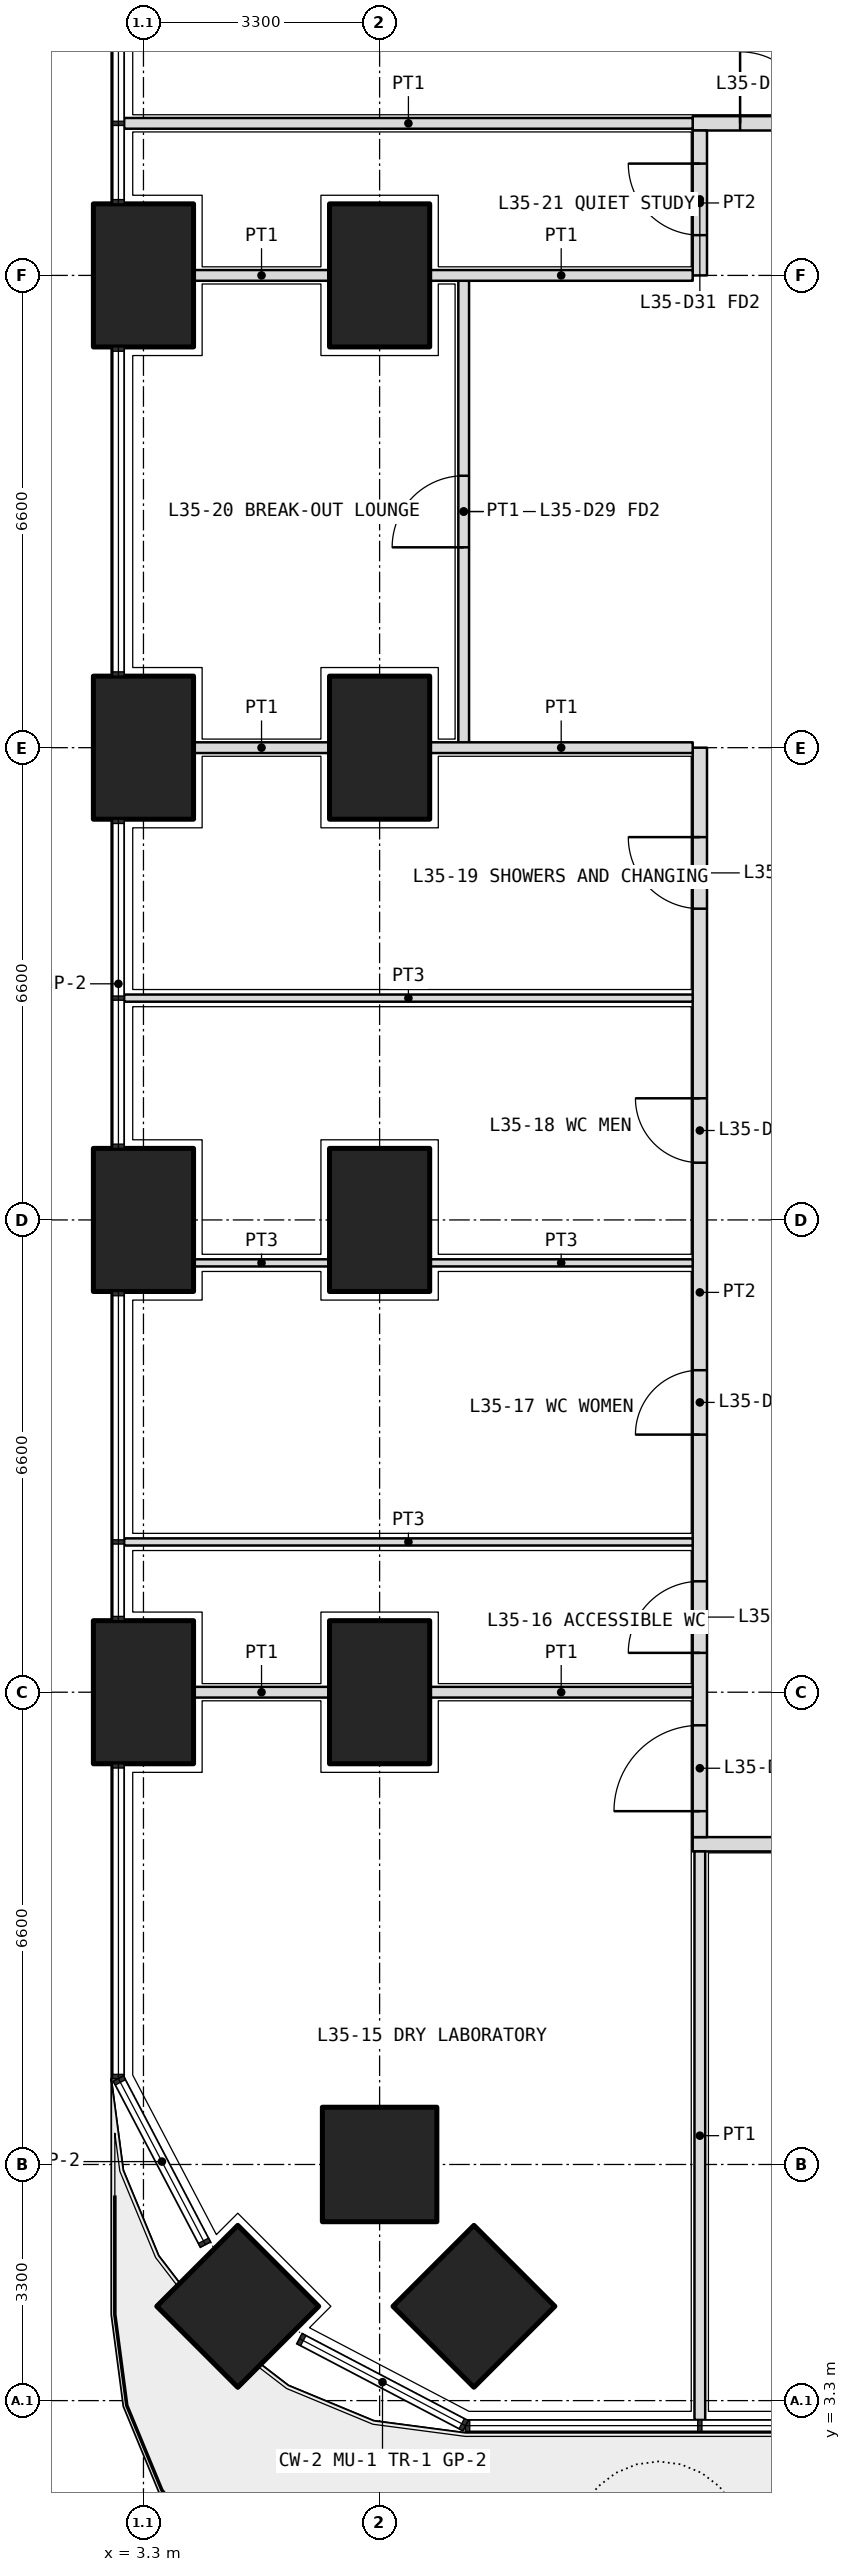
"""IFC4 building model, lengths in metres.
Left out: names, types, materials, properties, quantities, classifications, styles, units other than length and angle.
Written with IfcOpenShell. Run it as: python <this file> out.ifc"""

import sys

from ifc_helpers import new_model, si_unit, direction, frame, frame_2d, origin, origin_2d, place, context, subcontext, project, spatial, rectangle, extrude, element, fill, save


model = new_model("IFC4")
c1 = context("Model", 3, precision=1e-05, world=origin(), true_north=direction((0.0, 1.0)))
c2 = subcontext(c1, "Body", "Model", "MODEL_VIEW")
j1 = project(units=[si_unit("LENGTHUNIT", "METRE"), si_unit("PLANEANGLEUNIT", "RADIAN")], contexts=[c1])
p1 = place(None, origin())
s1 = spatial("IfcSite", under=j1, at=p1, CompositionType="ELEMENT")
p2 = place(p1, origin())
s2 = spatial("IfcBuilding", under=s1, at=p2, CompositionType="ELEMENT")
p3 = place(p2, frame((0.0, 0.0, 155.7)))
s3 = spatial("IfcBuildingStorey", under=s2, at=p3, CompositionType="ELEMENT", Elevation=155.7)
p4 = place(p3, frame((4.618, 4.618, 0.0), z_axis=(0.0, 0.0, 1.0), x_axis=(0.707106781187, 0.707106781187, 0.0)))
e1 = element("IfcColumn", 1, at=p4, inside=s3, PredefinedType="COLUMN", context=c2, shape_type="SweptSolid", body=[
    extrude(rectangle(XDim=1.6, YDim=1.6, at=origin_2d()), origin(), (0.0, 0.0, 1.0), 4.2),
])
for number, where, z_axis, x_axis in (
    (2, (3.3, 13.2, 0.0), (0.0, 0.0, 1.0), (0.0, 1.0, 0.0)),
    (3, (3.3, 19.8, 0.0), (0.0, 0.0, 1.0), (0.0, 1.0, 0.0)),
    (4, (3.3, 26.4, 0.0), (0.0, 0.0, 1.0), (0.0, 1.0, 0.0)),
    (5, (3.3, 33.0, 0.0), (0.0, 0.0, 1.0), (0.0, 1.0, 0.0)),
):
    element("IfcColumn", number, at=place(p3, frame(where, z_axis=z_axis, x_axis=x_axis)), inside=s3, PredefinedType="COLUMN", context=c2, shape_type="SweptSolid", body=[
        extrude(rectangle(XDim=2.0, YDim=1.4, at=origin_2d()), origin(), (0.0, 0.0, 1.0), 4.2),
    ])
for number, where, z_axis, x_axis in (
    (6, (6.6, 6.6, 0.0), (0.0, 0.0, 1.0), (1.0, 0.0, 0.0)),
    (7, (7.918, 4.618, 0.0), (0.0, 0.0, 1.0), (0.707, 0.707, 0.0)),
):
    element("IfcColumn", number, at=place(p3, frame(where, z_axis=z_axis, x_axis=x_axis)), inside=s3, PredefinedType="COLUMN", context=c2, shape_type="SweptSolid", body=[
        extrude(rectangle(XDim=1.6, YDim=1.6, at=origin_2d()), origin(), (0.0, 0.0, 1.0), 4.2),
    ])
for number, where, z_axis, x_axis in (
    (8, (6.6, 13.2, 0.0), (0.0, 0.0, 1.0), (0.0, 1.0, 0.0)),
    (9, (6.6, 19.8, 0.0), (0.0, 0.0, 1.0), (0.0, 1.0, 0.0)),
    (10, (6.6, 26.4, 0.0), (0.0, 0.0, 1.0), (0.0, 1.0, 0.0)),
    (11, (6.6, 33.0, 0.0), (0.0, 0.0, 1.0), (0.0, 1.0, 0.0)),
):
    element("IfcColumn", number, at=place(p3, frame(where, z_axis=z_axis, x_axis=x_axis)), inside=s3, PredefinedType="COLUMN", context=c2, shape_type="SweptSolid", body=[
        extrude(rectangle(XDim=2.0, YDim=1.4, at=origin_2d()), origin(), (0.0, 0.0, 1.0), 4.2),
    ])
p5 = place(p3, frame((10.975, 11.075, 0.0), z_axis=(0.0, 0.0, 1.0), x_axis=(1.0, 0.0, 0.0)))
e12 = element("IfcWall", 12, at=p5, inside=s3, PredefinedType="PARTITIONING", context=c2, shape_type="SweptSolid", body=[
    extrude(rectangle(XDim=30.85, YDim=0.2, at=frame_2d((15.425, 0.0))), origin(), (0.0, 0.0, 1.0), 2.85),
])
p6 = place(p5, frame((13.863, 0.0, 0.0)))
e13 = element("IfcOpeningElement", 13, at=p6, cuts=e12, PredefinedType="OPENING", context=c2, shape_type="SweptSolid", body=[
    extrude(rectangle(XDim=1.0, YDim=2.1, at=frame_2d((0.5, 1.05))), frame((0.0, 0.11, 0.0), z_axis=(0.0, -1.0, 0.0), x_axis=(1.0, 0.0, 0.0)), (0.0, 0.0, 1.0), 0.22),
])
p7 = place(p5, frame((29.087, 0.0, 0.0)))
e14 = element("IfcOpeningElement", 14, at=p7, cuts=e12, PredefinedType="OPENING", context=c2, shape_type="SweptSolid", body=[
    extrude(rectangle(XDim=1.2, YDim=2.1, at=frame_2d((0.6, 1.05))), frame((0.0, 0.11, 0.0), z_axis=(0.0, -1.0, 0.0), x_axis=(1.0, 0.0, 0.0)), (0.0, 0.0, 1.0), 0.22),
])
p8 = place(p3, frame((10.975, 35.125, 0.0), z_axis=(0.0, 0.0, 1.0), x_axis=(1.0, 0.0, 0.0)))
e15 = element("IfcWall", 15, at=p8, inside=s3, PredefinedType="PARTITIONING", context=c2, shape_type="SweptSolid", body=[
    extrude(rectangle(XDim=30.85, YDim=0.2, at=frame_2d((15.425, 0.0))), origin(), (0.0, 0.0, 1.0), 2.85),
])
p9 = place(p8, frame((0.663, 0.0, 0.0)))
e16 = element("IfcOpeningElement", 16, at=p9, cuts=e15, PredefinedType="OPENING", context=c2, shape_type="SweptSolid", body=[
    extrude(rectangle(XDim=1.0, YDim=2.1, at=frame_2d((0.5, 1.05))), frame((0.0, 0.11, 0.0), z_axis=(0.0, -1.0, 0.0), x_axis=(1.0, 0.0, 0.0)), (0.0, 0.0, 1.0), 0.22),
])
p10 = place(p8, frame((3.275, 0.0, 0.0)))
e17 = element("IfcOpeningElement", 17, at=p10, cuts=e15, PredefinedType="OPENING", context=c2, shape_type="SweptSolid", body=[
    extrude(rectangle(XDim=1.2, YDim=2.1, at=frame_2d((0.6, 1.05))), frame((0.0, 0.11, 0.0), z_axis=(0.0, -1.0, 0.0), x_axis=(1.0, 0.0, 0.0)), (0.0, 0.0, 1.0), 0.22),
])
p11 = place(p8, frame((8.325, 0.0, 0.0)))
e18 = element("IfcOpeningElement", 18, at=p11, cuts=e15, PredefinedType="OPENING", context=c2, shape_type="SweptSolid", body=[
    extrude(rectangle(XDim=1.0, YDim=2.1, at=frame_2d((0.5, 1.05))), frame((0.0, 0.11, 0.0), z_axis=(0.0, -1.0, 0.0), x_axis=(1.0, 0.0, 0.0)), (0.0, 0.0, 1.0), 0.22),
])
p12 = place(p8, frame((13.375, 0.0, 0.0)))
e19 = element("IfcOpeningElement", 19, at=p12, cuts=e15, PredefinedType="OPENING", context=c2, shape_type="SweptSolid", body=[
    extrude(rectangle(XDim=1.0, YDim=2.1, at=frame_2d((0.5, 1.05))), frame((0.0, 0.11, 0.0), z_axis=(0.0, -1.0, 0.0), x_axis=(1.0, 0.0, 0.0)), (0.0, 0.0, 1.0), 0.22),
])
p13 = place(p8, frame((16.675, 0.0, 0.0)))
e20 = element("IfcOpeningElement", 20, at=p13, cuts=e15, PredefinedType="OPENING", context=c2, shape_type="SweptSolid", body=[
    extrude(rectangle(XDim=1.0, YDim=2.1, at=frame_2d((0.5, 1.05))), frame((0.0, 0.11, 0.0), z_axis=(0.0, -1.0, 0.0), x_axis=(1.0, 0.0, 0.0)), (0.0, 0.0, 1.0), 0.22),
])
p14 = place(p8, frame((24.137, 0.0, 0.0)))
e21 = element("IfcOpeningElement", 21, at=p14, cuts=e15, PredefinedType="OPENING", context=c2, shape_type="SweptSolid", body=[
    extrude(rectangle(XDim=1.2, YDim=2.1, at=frame_2d((0.6, 1.05))), frame((0.0, 0.11, 0.0), z_axis=(0.0, -1.0, 0.0), x_axis=(1.0, 0.0, 0.0)), (0.0, 0.0, 1.0), 0.22),
])
p15 = place(p3, frame((11.075, 11.175, 0.0), z_axis=(0.0, 0.0, 1.0), x_axis=(0.0, 1.0, 0.0)))
e22 = element("IfcWall", 22, at=p15, inside=s3, PredefinedType="PARTITIONING", context=c2, shape_type="SweptSolid", body=[
    extrude(rectangle(XDim=15.225, YDim=0.2, at=frame_2d((7.612, 0.0))), origin(), (0.0, 0.0, 1.0), 2.85),
])
p16 = place(p15, frame((0.363, 0.0, 0.0)))
e23 = element("IfcOpeningElement", 23, at=p16, cuts=e22, PredefinedType="OPENING", context=c2, shape_type="SweptSolid", body=[
    extrude(rectangle(XDim=1.2, YDim=2.1, at=frame_2d((0.6, 1.05))), frame((0.0, 0.11, 0.0), z_axis=(0.0, -1.0, 0.0), x_axis=(1.0, 0.0, 0.0)), (0.0, 0.0, 1.0), 0.22),
])
p17 = place(p15, frame((2.575, 0.0, 0.0)))
e24 = element("IfcOpeningElement", 24, at=p17, cuts=e22, PredefinedType="OPENING", context=c2, shape_type="SweptSolid", body=[
    extrude(rectangle(XDim=1.0, YDim=2.1, at=frame_2d((0.5, 1.05))), frame((0.0, 0.11, 0.0), z_axis=(0.0, -1.0, 0.0), x_axis=(1.0, 0.0, 0.0)), (0.0, 0.0, 1.0), 0.22),
])
p18 = place(p15, frame((5.625, 0.0, 0.0)))
e25 = element("IfcOpeningElement", 25, at=p18, cuts=e22, PredefinedType="OPENING", context=c2, shape_type="SweptSolid", body=[
    extrude(rectangle(XDim=0.9, YDim=2.1, at=frame_2d((0.45, 1.05))), frame((0.0, 0.11, 0.0), z_axis=(0.0, -1.0, 0.0), x_axis=(1.0, 0.0, 0.0)), (0.0, 0.0, 1.0), 0.22),
])
p19 = place(p15, frame((9.425, 0.0, 0.0)))
e26 = element("IfcOpeningElement", 26, at=p19, cuts=e22, PredefinedType="OPENING", context=c2, shape_type="SweptSolid", body=[
    extrude(rectangle(XDim=0.9, YDim=2.1, at=frame_2d((0.45, 1.05))), frame((0.0, 0.11, 0.0), z_axis=(0.0, -1.0, 0.0), x_axis=(1.0, 0.0, 0.0)), (0.0, 0.0, 1.0), 0.22),
])
p20 = place(p15, frame((12.975, 0.0, 0.0)))
e27 = element("IfcOpeningElement", 27, at=p20, cuts=e22, PredefinedType="OPENING", context=c2, shape_type="SweptSolid", body=[
    extrude(rectangle(XDim=1.0, YDim=2.1, at=frame_2d((0.5, 1.05))), frame((0.0, 0.11, 0.0), z_axis=(0.0, -1.0, 0.0), x_axis=(1.0, 0.0, 0.0)), (0.0, 0.0, 1.0), 0.22),
])
p21 = place(p3, frame((11.075, 33.0, 0.0), z_axis=(0.0, 0.0, 1.0), x_axis=(0.0, 1.0, 0.0)))
e28 = element("IfcWall", 28, at=p21, inside=s3, PredefinedType="PARTITIONING", context=c2, shape_type="SweptSolid", body=[
    extrude(rectangle(XDim=2.025, YDim=0.2, at=frame_2d((1.012, 0.0))), origin(), (0.0, 0.0, 1.0), 2.85),
])
p22 = place(p21, frame((0.562, 0.0, 0.0)))
e29 = element("IfcOpeningElement", 29, at=p22, cuts=e28, PredefinedType="OPENING", context=c2, shape_type="SweptSolid", body=[
    extrude(rectangle(XDim=1.0, YDim=2.1, at=frame_2d((0.5, 1.05))), frame((0.0, 0.11, 0.0), z_axis=(0.0, -1.0, 0.0), x_axis=(1.0, 0.0, 0.0)), (0.0, 0.0, 1.0), 0.22),
])
for number, where, z_axis, x_axis in (
    (30, (11.075, 3.03, 0.0), (0.0, 0.0, 1.0), (0.0, 1.0, 0.0)),
    (31, (3.03, 35.125, 0.0), (0.0, 0.0, 1.0), (1.0, 0.0, 0.0)),
):
    element("IfcWall", number, at=place(p3, frame(where, z_axis=z_axis, x_axis=x_axis)), inside=s3, PredefinedType="PARTITIONING", context=c2, shape_type="SweptSolid", body=[
        extrude(rectangle(XDim=7.945, YDim=0.15, at=frame_2d((3.973, 0.0))), origin(), (0.0, 0.0, 1.0), 2.7),
    ])
p23 = place(p3, frame((3.03, 15.3, 0.0), z_axis=(0.0, 0.0, 1.0), x_axis=(1.0, 0.0, 0.0)))
e32 = element("IfcWall", 32, at=p23, inside=s3, PredefinedType="PARTITIONING", context=c2, shape_type="SweptSolid", body=[
    extrude(rectangle(XDim=7.945, YDim=0.1, at=frame_2d((3.973, 0.0))), origin(), (0.0, 0.0, 1.0), 2.7),
])
p24 = place(p3, frame((4.0, 19.2, 0.0), z_axis=(0.0, 0.0, 1.0), x_axis=(1.0, 0.0, 0.0)))
e33 = element("IfcWall", 33, at=p24, inside=s3, PredefinedType="PARTITIONING", context=c2, shape_type="SweptSolid", body=[
    extrude(rectangle(XDim=1.9, YDim=0.1, at=frame_2d((0.95, 0.0))), origin(), (0.0, 0.0, 1.0), 2.85),
])
p25 = place(p3, frame((7.3, 19.2, 0.0), z_axis=(0.0, 0.0, 1.0), x_axis=(1.0, 0.0, 0.0)))
e34 = element("IfcWall", 34, at=p25, inside=s3, PredefinedType="PARTITIONING", context=c2, shape_type="SweptSolid", body=[
    extrude(rectangle(XDim=3.675, YDim=0.1, at=frame_2d((1.837, 0.0))), origin(), (0.0, 0.0, 1.0), 2.85),
])
p26 = place(p3, frame((3.03, 22.9, 0.0), z_axis=(0.0, 0.0, 1.0), x_axis=(1.0, 0.0, 0.0)))
e35 = element("IfcWall", 35, at=p26, inside=s3, PredefinedType="PARTITIONING", context=c2, shape_type="SweptSolid", body=[
    extrude(rectangle(XDim=7.945, YDim=0.1, at=frame_2d((3.973, 0.0))), origin(), (0.0, 0.0, 1.0), 2.7),
])
p27 = place(p3, frame((7.775, 26.4, 0.0), z_axis=(0.0, 0.0, 1.0), x_axis=(0.0, 1.0, 0.0)))
e36 = element("IfcWall", 36, at=p27, inside=s3, PredefinedType="PARTITIONING", context=c2, shape_type="SweptSolid", body=[
    extrude(rectangle(XDim=6.6, YDim=0.15, at=frame_2d((3.3, 0.0))), origin(), (0.0, 0.0, 1.0), 2.85),
])
p28 = place(p27, frame((2.8, 0.0, 0.0)))
e37 = element("IfcOpeningElement", 37, at=p28, cuts=e36, PredefinedType="OPENING", context=c2, shape_type="SweptSolid", body=[
    extrude(rectangle(XDim=1.0, YDim=2.1, at=frame_2d((0.5, 1.05))), frame((0.0, 0.085, 0.0), z_axis=(0.0, -1.0, 0.0), x_axis=(1.0, 0.0, 0.0)), (0.0, 0.0, 1.0), 0.17),
])
p29 = place(p3, frame((4.0, 13.2, 0.0), z_axis=(0.0, 0.0, 1.0), x_axis=(1.0, 0.0, 0.0)))
e38 = element("IfcWall", 38, at=p29, inside=s3, PredefinedType="PARTITIONING", context=c2, shape_type="SweptSolid", body=[
    extrude(rectangle(XDim=1.9, YDim=0.15, at=frame_2d((0.95, 0.0))), origin(), (0.0, 0.0, 1.0), 2.85),
])
p30 = place(p3, frame((7.3, 13.2, 0.0), z_axis=(0.0, 0.0, 1.0), x_axis=(1.0, 0.0, 0.0)))
e39 = element("IfcWall", 39, at=p30, inside=s3, PredefinedType="PARTITIONING", context=c2, shape_type="SweptSolid", body=[
    extrude(rectangle(XDim=3.675, YDim=0.15, at=frame_2d((1.837, 0.0))), origin(), (0.0, 0.0, 1.0), 2.85),
])
p31 = place(p3, frame((4.0, 26.4, 0.0), z_axis=(0.0, 0.0, 1.0), x_axis=(1.0, 0.0, 0.0)))
e40 = element("IfcWall", 40, at=p31, inside=s3, PredefinedType="PARTITIONING", context=c2, shape_type="SweptSolid", body=[
    extrude(rectangle(XDim=1.9, YDim=0.15, at=frame_2d((0.95, 0.0))), origin(), (0.0, 0.0, 1.0), 2.85),
])
p32 = place(p3, frame((7.3, 26.4, 0.0), z_axis=(0.0, 0.0, 1.0), x_axis=(1.0, 0.0, 0.0)))
e41 = element("IfcWall", 41, at=p32, inside=s3, PredefinedType="PARTITIONING", context=c2, shape_type="SweptSolid", body=[
    extrude(rectangle(XDim=3.675, YDim=0.15, at=frame_2d((1.837, 0.0))), origin(), (0.0, 0.0, 1.0), 2.85),
])
p33 = place(p3, frame((4.0, 33.0, 0.0), z_axis=(0.0, 0.0, 1.0), x_axis=(1.0, 0.0, 0.0)))
e42 = element("IfcWall", 42, at=p33, inside=s3, PredefinedType="PARTITIONING", context=c2, shape_type="SweptSolid", body=[
    extrude(rectangle(XDim=1.9, YDim=0.15, at=frame_2d((0.95, 0.0))), origin(), (0.0, 0.0, 1.0), 2.85),
])
p34 = place(p3, frame((7.3, 33.0, 0.0), z_axis=(0.0, 0.0, 1.0), x_axis=(1.0, 0.0, 0.0)))
e43 = element("IfcWall", 43, at=p34, inside=s3, PredefinedType="PARTITIONING", context=c2, shape_type="SweptSolid", body=[
    extrude(rectangle(XDim=3.675, YDim=0.15, at=frame_2d((1.837, 0.0))), origin(), (0.0, 0.0, 1.0), 2.85),
])
p35 = place(p9, origin())
e44 = element("IfcDoor", 44, at=p35, inside=s3, OperationType="SINGLE_SWING_LEFT", PredefinedType="DOOR", context=c2, shape_type="SweptSolid", body=[
    extrude(rectangle(XDim=1.0, YDim=2.1, at=frame_2d((0.5, 1.05))), frame((0.0, 0.025, 0.0), z_axis=(0.0, -1.0, 0.0), x_axis=(1.0, 0.0, 0.0)), (0.0, 0.0, 1.0), 0.05),
])
fill(e16, e44)
p36 = place(p16, origin())
e45 = element("IfcDoor", 45, at=p36, inside=s3, OperationType="DOUBLE_DOOR_SINGLE_SWING", PredefinedType="DOOR", context=c2, shape_type="SweptSolid", body=[
    extrude(rectangle(XDim=1.2, YDim=2.1, at=frame_2d((0.6, 1.05))), frame((0.0, 0.025, 0.0), z_axis=(0.0, -1.0, 0.0), x_axis=(1.0, 0.0, 0.0)), (0.0, 0.0, 1.0), 0.05),
])
fill(e23, e45)
p37 = place(p17, origin())
e46 = element("IfcDoor", 46, at=p37, inside=s3, OperationType="SINGLE_SWING_LEFT", PredefinedType="DOOR", context=c2, shape_type="SweptSolid", body=[
    extrude(rectangle(XDim=1.0, YDim=2.1, at=frame_2d((0.5, 1.05))), frame((0.0, 0.025, 0.0), z_axis=(0.0, -1.0, 0.0), x_axis=(1.0, 0.0, 0.0)), (0.0, 0.0, 1.0), 0.05),
])
fill(e24, e46)
p38 = place(p18, origin())
e47 = element("IfcDoor", 47, at=p38, inside=s3, OperationType="SINGLE_SWING_LEFT", PredefinedType="DOOR", context=c2, shape_type="SweptSolid", body=[
    extrude(rectangle(XDim=0.9, YDim=2.1, at=frame_2d((0.45, 1.05))), frame((0.0, 0.025, 0.0), z_axis=(0.0, -1.0, 0.0), x_axis=(1.0, 0.0, 0.0)), (0.0, 0.0, 1.0), 0.05),
])
fill(e25, e47)
p39 = place(p19, origin())
e48 = element("IfcDoor", 48, at=p39, inside=s3, OperationType="SINGLE_SWING_RIGHT", PredefinedType="DOOR", context=c2, shape_type="SweptSolid", body=[
    extrude(rectangle(XDim=0.9, YDim=2.1, at=frame_2d((0.45, 1.05))), frame((0.0, 0.025, 0.0), z_axis=(0.0, -1.0, 0.0), x_axis=(1.0, 0.0, 0.0)), (0.0, 0.0, 1.0), 0.05),
])
fill(e26, e48)
p40 = place(p20, origin())
e49 = element("IfcDoor", 49, at=p40, inside=s3, OperationType="SINGLE_SWING_RIGHT", PredefinedType="DOOR", context=c2, shape_type="SweptSolid", body=[
    extrude(rectangle(XDim=1.0, YDim=2.1, at=frame_2d((0.5, 1.05))), frame((0.0, 0.025, 0.0), z_axis=(0.0, -1.0, 0.0), x_axis=(1.0, 0.0, 0.0)), (0.0, 0.0, 1.0), 0.05),
])
fill(e27, e49)
p41 = place(p28, origin())
e50 = element("IfcDoor", 50, at=p41, inside=s3, OperationType="SINGLE_SWING_LEFT", PredefinedType="DOOR", context=c2, shape_type="SweptSolid", body=[
    extrude(rectangle(XDim=1.0, YDim=2.1, at=frame_2d((0.5, 1.05))), frame((0.0, 0.025, 0.0), z_axis=(0.0, -1.0, 0.0), x_axis=(1.0, 0.0, 0.0)), (0.0, 0.0, 1.0), 0.05),
])
fill(e37, e50)
p42 = place(p22, origin())
e51 = element("IfcDoor", 51, at=p42, inside=s3, OperationType="SINGLE_SWING_RIGHT", PredefinedType="DOOR", context=c2, shape_type="SweptSolid", body=[
    extrude(rectangle(XDim=1.0, YDim=2.1, at=frame_2d((0.5, 1.05))), frame((0.0, 0.025, 0.0), z_axis=(0.0, -1.0, 0.0), x_axis=(1.0, 0.0, 0.0)), (0.0, 0.0, 1.0), 0.05),
])
fill(e29, e51)
save(model, sys.argv[1])
